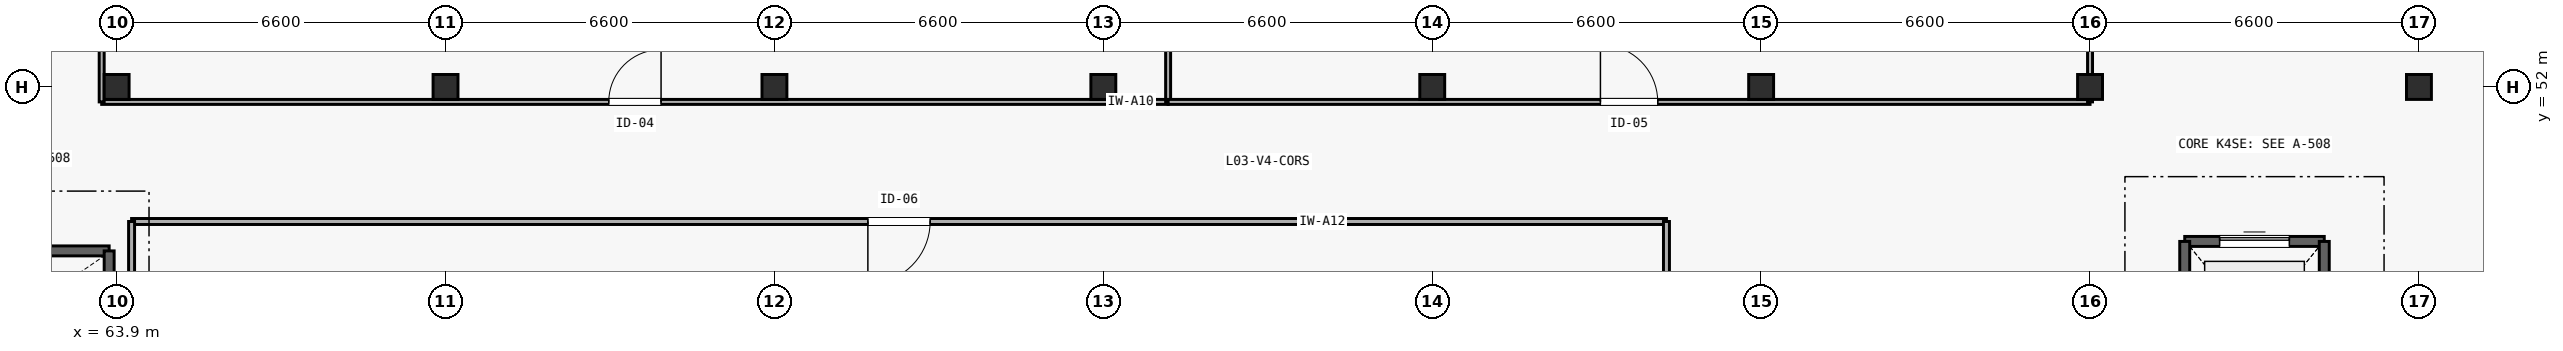
"""IFC4 building model, lengths in metres.
Left out: names, types, materials, properties, quantities, classifications, styles, units other than length and angle.
Written with IfcOpenShell. Run it as: python <this file> out.ifc"""

import sys

from ifc_helpers import new_model, si_unit, direction, frame, frame_2d, origin, origin_2d, place, context, subcontext, project, spatial, rectangle, extrude, element, fill, save


model = new_model("IFC4")
c1 = context("Model", 3, precision=1e-05, world=origin(), true_north=direction((0.0, 1.0)))
c2 = subcontext(c1, "Body", "Model", "MODEL_VIEW")
j1 = project(units=[si_unit("LENGTHUNIT", "METRE"), si_unit("PLANEANGLEUNIT", "RADIAN")], contexts=[c1])
p1 = place(None, origin())
s1 = spatial("IfcSite", under=j1, at=p1, CompositionType="ELEMENT")
p2 = place(p1, origin())
s2 = spatial("IfcBuilding", under=s1, at=p2, CompositionType="ELEMENT")
p3 = place(p2, frame((0.0, 0.0, 12.6)))
s3 = spatial("IfcBuildingStorey", under=s2, at=p3, CompositionType="ELEMENT", Elevation=12.6)
for number, where, z_axis, x_axis in (
    (1, (63.9, 52.0, 0.0), (0.0, 0.0, 1.0), (1.0, 0.0, 0.0)),
    (2, (70.5, 52.0, 0.0), (0.0, 0.0, 1.0), (1.0, 0.0, 0.0)),
    (3, (77.1, 52.0, 0.0), (0.0, 0.0, 1.0), (1.0, 0.0, 0.0)),
    (4, (83.7, 52.0, 0.0), (0.0, 0.0, 1.0), (1.0, 0.0, 0.0)),
    (5, (90.3, 52.0, 0.0), (0.0, 0.0, 1.0), (1.0, 0.0, 0.0)),
    (6, (96.9, 52.0, 0.0), (0.0, 0.0, 1.0), (1.0, 0.0, 0.0)),
    (7, (103.5, 52.0, 0.0), (0.0, 0.0, 1.0), (1.0, 0.0, 0.0)),
    (8, (110.1, 52.0, 0.0), (0.0, 0.0, 1.0), (1.0, 0.0, 0.0)),
):
    element("IfcColumn", number, at=place(p3, frame(where, z_axis=z_axis, x_axis=x_axis)), inside=s3, PredefinedType="COLUMN", context=c2, shape_type="SweptSolid", body=[
        extrude(rectangle(XDim=0.5, YDim=0.5, at=origin_2d()), origin(), (0.0, 0.0, 1.0), 4.2),
    ])
p4 = place(p3, frame((57.45, 48.71, 0.0), z_axis=(0.0, 0.0, 1.0), x_axis=(1.0, 0.0, 0.0)))
e9 = element("IfcWall", 9, at=p4, inside=s3, PredefinedType="SHEAR", context=c2, shape_type="SweptSolid", body=[
    extrude(rectangle(XDim=6.3, YDim=0.2, at=frame_2d((3.15, 0.0))), origin(), (0.0, 0.0, 1.0), 4.2),
])
p5 = place(p4, frame((0.32, 0.0, 0.0)))
e10 = element("IfcOpeningElement", 10, at=p5, cuts=e9, PredefinedType="OPENING", context=c2, shape_type="SweptSolid", body=[
    extrude(rectangle(XDim=1.2, YDim=2.15, at=frame_2d((0.6, 1.075))), frame((0.0, 0.11, 0.0), z_axis=(0.0, -1.0, 0.0), x_axis=(1.0, 0.0, 0.0)), (0.0, 0.0, 1.0), 0.22),
])
p6 = place(p3, frame((63.75, 45.35, 0.0), z_axis=(0.0, 0.0, 1.0), x_axis=(0.0, 1.0, 0.0)))
e11 = element("IfcWall", 11, at=p6, inside=s3, PredefinedType="SHEAR", context=c2, shape_type="SweptSolid", body=[
    extrude(rectangle(XDim=3.36, YDim=0.2, at=frame_2d((1.68, 0.0))), origin(), (0.0, 0.0, 1.0), 4.2),
])
p7 = place(p3, frame((105.4, 48.9, 0.0), z_axis=(0.0, 0.0, 1.0), x_axis=(1.0, 0.0, 0.0)))
e12 = element("IfcWall", 12, at=p7, inside=s3, PredefinedType="SHEAR", context=c2, shape_type="SweptSolid", body=[
    extrude(rectangle(XDim=2.8, YDim=0.2, at=frame_2d((1.4, 0.0))), origin(), (0.0, 0.0, 1.0), 4.2),
])
p8 = place(p7, frame((0.7, 0.0, 0.0)))
e13 = element("IfcOpeningElement", 13, at=p8, cuts=e12, PredefinedType="OPENING", context=c2, shape_type="SweptSolid", body=[
    extrude(rectangle(XDim=1.4, YDim=2.3, at=frame_2d((0.7, 1.15))), frame((0.0, 0.11, 0.0), z_axis=(0.0, -1.0, 0.0), x_axis=(1.0, 0.0, 0.0)), (0.0, 0.0, 1.0), 0.22),
])
for number, where, z_axis, x_axis in (
    (14, (105.4, 45.5, 0.0), (0.0, 0.0, 1.0), (0.0, 1.0, 0.0)),
    (15, (108.2, 45.5, 0.0), (0.0, 0.0, 1.0), (0.0, 1.0, 0.0)),
):
    element("IfcWall", number, at=place(p3, frame(where, z_axis=z_axis, x_axis=x_axis)), inside=s3, PredefinedType="SHEAR", context=c2, shape_type="SweptSolid", body=[
        extrude(rectangle(XDim=3.4, YDim=0.2, at=frame_2d((1.7, 0.0))), origin(), (0.0, 0.0, 1.0), 4.2),
    ])
p9 = place(p3, frame((63.6, 51.7, 0.0), z_axis=(0.0, 0.0, 1.0), x_axis=(1.0, 0.0, 0.0)))
e16 = element("IfcWall", 16, at=p9, inside=s3, PredefinedType="PARTITIONING", context=c2, shape_type="SweptSolid", body=[
    extrude(rectangle(XDim=21.4, YDim=0.1, at=frame_2d((10.7, 0.0))), origin(), (0.0, 0.0, 1.0), 3.405),
])
p10 = place(p9, frame((10.175, 0.0, 0.0)))
e17 = element("IfcOpeningElement", 17, at=p10, cuts=e16, PredefinedType="OPENING", context=c2, shape_type="SweptSolid", body=[
    extrude(rectangle(XDim=1.05, YDim=2.15, at=frame_2d((0.525, 1.075))), frame((0.0, 0.06, 0.0), z_axis=(0.0, -1.0, 0.0), x_axis=(1.0, 0.0, 0.0)), (0.0, 0.0, 1.0), 0.12),
])
for number, where, z_axis, x_axis in (
    (18, (63.6, 51.7, 0.0), (0.0, 0.0, 1.0), (0.0, 1.0, 0.0)),
    (19, (85.0, 51.7, 0.0), (0.0, 0.0, 1.0), (0.0, 1.0, 0.0)),
):
    element("IfcWall", number, at=place(p3, frame(where, z_axis=z_axis, x_axis=x_axis)), inside=s3, PredefinedType="PARTITIONING", context=c2, shape_type="SweptSolid", body=[
        extrude(rectangle(XDim=7.1, YDim=0.1, at=frame_2d((3.55, 0.0))), origin(), (0.0, 0.0, 1.0), 3.9),
    ])
p11 = place(p3, frame((85.0, 51.7, 0.0), z_axis=(0.0, 0.0, 1.0), x_axis=(1.0, 0.0, 0.0)))
e20 = element("IfcWall", 20, at=p11, inside=s3, PredefinedType="PARTITIONING", context=c2, shape_type="SweptSolid", body=[
    extrude(rectangle(XDim=18.5, YDim=0.1, at=frame_2d((9.25, 0.0))), origin(), (0.0, 0.0, 1.0), 3.405),
])
p12 = place(p11, frame((8.675, 0.0, 0.0)))
e21 = element("IfcOpeningElement", 21, at=p12, cuts=e20, PredefinedType="OPENING", context=c2, shape_type="SweptSolid", body=[
    extrude(rectangle(XDim=1.15, YDim=2.15, at=frame_2d((0.575, 1.075))), frame((0.0, 0.06, 0.0), z_axis=(0.0, -1.0, 0.0), x_axis=(1.0, 0.0, 0.0)), (0.0, 0.0, 1.0), 0.12),
])
p13 = place(p3, frame((103.5, 51.7, 0.0), z_axis=(0.0, 0.0, 1.0), x_axis=(0.0, 1.0, 0.0)))
e22 = element("IfcWall", 22, at=p13, inside=s3, PredefinedType="PARTITIONING", context=c2, shape_type="SweptSolid", body=[
    extrude(rectangle(XDim=7.1, YDim=0.1, at=frame_2d((3.55, 0.0))), origin(), (0.0, 0.0, 1.0), 3.9),
])
p14 = place(p3, frame((64.2, 49.3, 0.0), z_axis=(0.0, 0.0, 1.0), x_axis=(1.0, 0.0, 0.0)))
e23 = element("IfcWall", 23, at=p14, inside=s3, PredefinedType="PARTITIONING", context=c2, shape_type="SweptSolid", body=[
    extrude(rectangle(XDim=30.8, YDim=0.12, at=frame_2d((15.4, 0.0))), origin(), (0.0, 0.0, 1.0), 3.9),
])
p15 = place(p14, frame((14.775, 0.0, 0.0)))
e24 = element("IfcOpeningElement", 24, at=p15, cuts=e23, PredefinedType="OPENING", context=c2, shape_type="SweptSolid", body=[
    extrude(rectangle(XDim=1.25, YDim=2.15, at=frame_2d((0.625, 1.075))), frame((0.0, 0.07, 0.0), z_axis=(0.0, -1.0, 0.0), x_axis=(1.0, 0.0, 0.0)), (0.0, 0.0, 1.0), 0.14),
])
p16 = place(p3, frame((64.2, 38.2, 0.0), z_axis=(0.0, 0.0, 1.0), x_axis=(0.0, 1.0, 0.0)))
e25 = element("IfcWall", 25, at=p16, inside=s3, PredefinedType="PARTITIONING", context=c2, shape_type="SweptSolid", body=[
    extrude(rectangle(XDim=11.1, YDim=0.12, at=frame_2d((5.55, 0.0))), origin(), (0.0, 0.0, 1.0), 3.325),
])
p17 = place(p3, frame((95.0, 38.2, 0.0), z_axis=(0.0, 0.0, 1.0), x_axis=(0.0, 1.0, 0.0)))
e26 = element("IfcWall", 26, at=p17, inside=s3, PredefinedType="PARTITIONING", context=c2, shape_type="SweptSolid", body=[
    extrude(rectangle(XDim=11.1, YDim=0.12, at=frame_2d((5.55, 0.0))), origin(), (0.0, 0.0, 1.0), 3.9),
])
p18 = place(p8, origin())
e27 = element("IfcDoor", 27, at=p18, inside=s3, OperationType="SLIDING_TO_LEFT", PredefinedType="DOOR", context=c2, shape_type="SweptSolid", body=[
    extrude(rectangle(XDim=1.4, YDim=2.3, at=frame_2d((0.7, 1.15))), frame((0.0, 0.025, 0.0), z_axis=(0.0, -1.0, 0.0), x_axis=(1.0, 0.0, 0.0)), (0.0, 0.0, 1.0), 0.05),
])
fill(e13, e27)
p19 = place(p10, origin())
e28 = element("IfcDoor", 28, at=p19, inside=s3, OperationType="SINGLE_SWING_RIGHT", PredefinedType="DOOR", context=c2, shape_type="SweptSolid", body=[
    extrude(rectangle(XDim=1.05, YDim=2.15, at=frame_2d((0.525, 1.075))), frame((0.0, 0.025, 0.0), z_axis=(0.0, -1.0, 0.0), x_axis=(1.0, 0.0, 0.0)), (0.0, 0.0, 1.0), 0.05),
])
fill(e17, e28)
p20 = place(p12, origin())
e29 = element("IfcDoor", 29, at=p20, inside=s3, OperationType="SINGLE_SWING_LEFT", PredefinedType="DOOR", context=c2, shape_type="SweptSolid", body=[
    extrude(rectangle(XDim=1.15, YDim=2.15, at=frame_2d((0.575, 1.075))), frame((0.0, 0.025, 0.0), z_axis=(0.0, -1.0, 0.0), x_axis=(1.0, 0.0, 0.0)), (0.0, 0.0, 1.0), 0.05),
])
fill(e21, e29)
p21 = place(p15, frame((1.25, 0.0, 0.0), z_axis=(0.0, 0.0, 1.0), x_axis=(-1.0, 0.0, 0.0)))
e30 = element("IfcDoor", 30, at=p21, inside=s3, OperationType="SINGLE_SWING_RIGHT", PredefinedType="DOOR", context=c2, shape_type="SweptSolid", body=[
    extrude(rectangle(XDim=1.25, YDim=2.15, at=frame_2d((0.625, 1.075))), frame((0.0, 0.025, 0.0), z_axis=(0.0, -1.0, 0.0), x_axis=(1.0, 0.0, 0.0)), (0.0, 0.0, 1.0), 0.05),
])
fill(e24, e30)
save(model, sys.argv[1])
